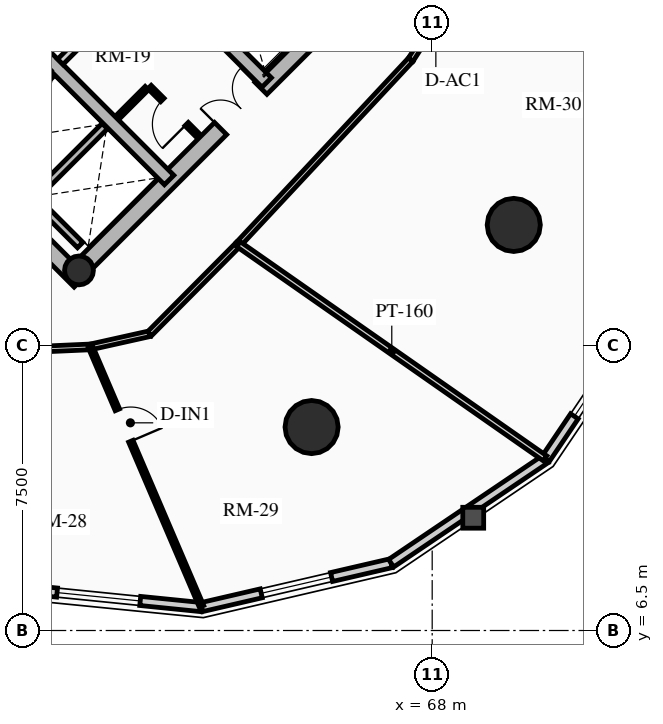
"""IFC4 building model, lengths in metres.
Left out: names, types, materials, properties, quantities, classifications, styles, units other than length and angle.
Written with IfcOpenShell. Run it as: python <this file> out.ifc"""

import sys

from ifc_helpers import new_model, si_unit, direction, frame, frame_2d, origin, origin_2d, place, context, subcontext, project, spatial, rectangle, circle, hollow_circle, extrude, source, transform, mapped, element, fill, save


model = new_model("IFC4")
c1 = context("Model", 3, precision=1e-05, world=origin(), true_north=direction((0.0, 1.0)))
c2 = subcontext(c1, "Body", "Model", "MODEL_VIEW")
j1 = project(units=[si_unit("LENGTHUNIT", "METRE"), si_unit("PLANEANGLEUNIT", "RADIAN")], contexts=[c1])
p1 = place(None, origin())
s1 = spatial("IfcSite", under=j1, at=p1, CompositionType="ELEMENT")
p2 = place(p1, origin())
s2 = spatial("IfcBuilding", under=s1, at=p2, CompositionType="ELEMENT")
p3 = place(p2, frame((0.0, 0.0, 113.8)))
s3 = spatial("IfcBuildingStorey", under=s2, at=p3, CompositionType="ELEMENT", Elevation=113.8)
p4 = place(p3, frame((58.737, 15.697, 0.0), z_axis=(0.0, 0.0, 1.0), x_axis=(-0.707106781187, 0.707106781187, 0.0)))
e1 = element("IfcWall", 1, at=p4, inside=s3, PredefinedType="SHEAR", context=c2, shape_type="SweptSolid", body=[
    extrude(rectangle(XDim=14.2, YDim=0.45, at=frame_2d((7.1, 0.0))), origin(), (0.0, 0.0, 1.0), 2.91),
])
p5 = place(p3, frame((58.578, 15.856, 0.0), z_axis=(0.0, 0.0, 1.0), x_axis=(0.707106781187, 0.707106781187, 0.0)))
e2 = element("IfcWall", 2, at=p5, inside=s3, PredefinedType="SHEAR", context=c2, shape_type="SweptSolid", body=[
    extrude(rectangle(XDim=10.7, YDim=0.45, at=frame_2d((5.35, 0.0))), origin(), (0.0, 0.0, 1.0), 2.91),
])
m1 = source(origin(), c2, "Body", "SweptSolid", [
    extrude(rectangle(XDim=1.5, YDim=2.02, at=frame_2d((0.75, 1.01))), frame((0.0, 0.235, 0.0), z_axis=(0.0, -1.0, 0.0), x_axis=(1.0, 0.0, 0.0)), (0.0, 0.0, 1.0), 0.47),
])
p6 = place(p5, frame((5.45, 0.0, 0.0)))
e3 = element("IfcOpeningElement", 3, at=p6, cuts=e2, PredefinedType="OPENING", context=c2, shape_type="MappedRepresentation", body=[
    mapped(m1, transform((0.0, 0.0, 0.0), x_axis=(1.0, 0.0, 0.0), y_axis=(0.0, 1.0, 0.0), z_axis=(0.0, 0.0, 1.0), scale=1.0)),
])
p7 = place(p3, frame((61.078, 18.355, 0.0), z_axis=(0.0, 0.0, 1.0), x_axis=(-0.707106781187, 0.707106781187, 0.0)))
e4 = element("IfcWall", 4, at=p7, inside=s3, PredefinedType="SHEAR", context=c2, shape_type="SweptSolid", body=[
    extrude(rectangle(XDim=13.75, YDim=0.35, at=frame_2d((6.875, 0.0))), origin(), (0.0, 0.0, 1.0), 2.91),
])
m2 = source(origin(), c2, "Body", "SweptSolid", [
    extrude(rectangle(XDim=1.1, YDim=2.015, at=frame_2d((0.55, 1.007))), frame((0.0, 0.185, 0.0), z_axis=(0.0, -1.0, 0.0), x_axis=(1.0, 0.0, 0.0)), (0.0, 0.0, 1.0), 0.37),
])
p8 = place(p7, frame((4.875, 0.0, 0.0)))
e5 = element("IfcOpeningElement", 5, at=p8, cuts=e4, PredefinedType="OPENING", context=c2, shape_type="MappedRepresentation", body=[
    mapped(m2, transform((0.0, 0.0, 0.0), x_axis=(1.0, 0.0, 0.0), y_axis=(0.0, 1.0, 0.0), z_axis=(0.0, 0.0, 1.0), scale=1.0)),
])
m3 = source(origin(), c2, "Body", "SweptSolid", [
    extrude(rectangle(XDim=1.15, YDim=2.02, at=frame_2d((0.575, 1.01))), frame((0.0, 0.185, 0.0), z_axis=(0.0, -1.0, 0.0), x_axis=(1.0, 0.0, 0.0)), (0.0, 0.0, 1.0), 0.37),
])
p9 = place(p7, frame((7.295, 0.0, 0.0)))
e6 = element("IfcOpeningElement", 6, at=p9, cuts=e4, PredefinedType="OPENING", context=c2, shape_type="MappedRepresentation", body=[
    mapped(m3, transform((0.0, 0.0, 0.0), x_axis=(1.0, 0.0, 0.0), y_axis=(0.0, 1.0, 0.0), z_axis=(0.0, 0.0, 1.0), scale=1.0)),
])
p10 = place(p3, frame((63.645, 20.922, 0.0), z_axis=(0.0, 0.0, 1.0), x_axis=(-0.707106781187, 0.707106781187, 0.0)))
e7 = element("IfcWall", 7, at=p10, inside=s3, PredefinedType="SHEAR", context=c2, shape_type="SweptSolid", body=[
    extrude(rectangle(XDim=13.75, YDim=0.35, at=frame_2d((6.875, 0.0))), origin(), (0.0, 0.0, 1.0), 2.91),
])
p11 = place(p10, frame((10.0, 0.0, 0.0)))
e8 = element("IfcOpeningElement", 8, at=p11, cuts=e7, PredefinedType="OPENING", context=c2, shape_type="MappedRepresentation", body=[
    mapped(m2, transform((0.0, 0.0, 0.0), x_axis=(1.0, 0.0, 0.0), y_axis=(0.0, 1.0, 0.0), z_axis=(0.0, 0.0, 1.0), scale=1.0)),
])
p12 = place(p10, frame((12.0, 0.0, 0.0)))
e9 = element("IfcOpeningElement", 9, at=p12, cuts=e7, PredefinedType="OPENING", context=c2, shape_type="MappedRepresentation", body=[
    mapped(m2, transform((0.0, 0.0, 0.0), x_axis=(1.0, 0.0, 0.0), y_axis=(0.0, 1.0, 0.0), z_axis=(0.0, 0.0, 1.0), scale=1.0)),
])
p13 = place(p10, frame((5.305, 0.0, 0.0)))
e10 = element("IfcOpeningElement", 10, at=p13, cuts=e7, PredefinedType="OPENING", context=c2, shape_type="MappedRepresentation", body=[
    mapped(m3, transform((0.0, 0.0, 0.0), x_axis=(1.0, 0.0, 0.0), y_axis=(0.0, 1.0, 0.0), z_axis=(0.0, 0.0, 1.0), scale=1.0)),
])
p14 = place(p3, frame((58.706, 15.976, 0.0), z_axis=(0.0, 0.0, 1.0), x_axis=(0.707106781187, 0.707106781187, 0.0)))
e11 = element("IfcColumn", 11, at=p14, inside=s3, PredefinedType="COLUMN", context=c2, shape_type="SweptSolid", body=[
    extrude(hollow_circle(Radius=0.38, WallThickness=0.032, at=origin_2d()), origin(), (0.0, 0.0, 1.0), 2.91),
])
for number, where, z_axis, x_axis in (
    (12, (64.827, 11.854, 0.0), (0.0, 0.0, 1.0), (1.0, 0.0, 0.0)),
    (13, (70.146, 17.173, 0.0), (0.0, 0.0, 1.0), (1.0, 0.0, 0.0)),
):
    element("IfcColumn", number, at=place(p3, frame(where, z_axis=z_axis, x_axis=x_axis)), inside=s3, PredefinedType="USERDEFINED", context=c2, shape_type="SweptSolid", body=[
        extrude(circle(Radius=0.7, at=origin_2d()), origin(), (0.0, 0.0, 1.0), 2.91),
    ])
p15 = place(p3, frame((61.933, 7.115, 0.0), z_axis=(0.0, 0.0, 1.0), x_axis=(-0.994971754311, 0.10015591906, 0.0)))
e14 = element("IfcWall", 14, at=p15, inside=s3, PredefinedType="SOLIDWALL", context=c2, shape_type="SweptSolid", body=[
    extrude(rectangle(XDim=5.448, YDim=0.24, at=frame_2d((2.724, 0.0))), origin(), (0.0, 0.0, 1.0), 2.179),
])
m4 = source(origin(), c2, "Body", "SweptSolid", [
    extrude(rectangle(XDim=2.2, YDim=1.35, at=frame_2d((1.1, 0.675))), frame((0.0, 0.13, 0.0), z_axis=(0.0, -1.0, 0.0), x_axis=(1.0, 0.0, 0.0)), (0.0, 0.0, 1.0), 0.26),
])
p16 = place(p15, frame((1.624, 0.0, 0.65)))
e15 = element("IfcOpeningElement", 15, at=p16, cuts=e14, PredefinedType="OPENING", context=c2, shape_type="MappedRepresentation", body=[
    mapped(m4, transform((0.0, 0.0, 0.0), x_axis=(1.0, 0.0, 0.0), y_axis=(0.0, 1.0, 0.0), z_axis=(0.0, 0.0, 1.0), scale=1.0)),
])
p17 = place(p3, frame((66.92, 8.271, 0.0), z_axis=(0.0, 0.0, 1.0), x_axis=(-0.974165631126, -0.225834725257, 0.0)))
e16 = element("IfcWall", 16, at=p17, inside=s3, PredefinedType="SOLIDWALL", context=c2, shape_type="SweptSolid", body=[
    extrude(rectangle(XDim=5.119, YDim=0.24, at=frame_2d((2.56, 0.0))), origin(), (0.0, 0.0, 1.0), 2.179),
])
m5 = source(origin(), c2, "Body", "SweptSolid", [
    extrude(rectangle(XDim=1.9, YDim=1.35, at=frame_2d((0.95, 0.675))), frame((0.0, 0.13, 0.0), z_axis=(0.0, -1.0, 0.0), x_axis=(1.0, 0.0, 0.0)), (0.0, 0.0, 1.0), 0.26),
])
p18 = place(p17, frame((1.609, 0.0, 0.65)))
e17 = element("IfcOpeningElement", 17, at=p18, cuts=e16, PredefinedType="OPENING", context=c2, shape_type="MappedRepresentation", body=[
    mapped(m5, transform((0.0, 0.0, 0.0), x_axis=(1.0, 0.0, 0.0), y_axis=(0.0, 1.0, 0.0), z_axis=(0.0, 0.0, 1.0), scale=1.0)),
])
p19 = place(p3, frame((70.985, 11.015, 0.0), z_axis=(0.0, 0.0, 1.0), x_axis=(-0.828781148131, -0.559572880421, 0.0)))
e18 = element("IfcWall", 18, at=p19, inside=s3, PredefinedType="SOLIDWALL", context=c2, shape_type="SweptSolid", body=[
    extrude(rectangle(XDim=4.905, YDim=0.24, at=frame_2d((2.452, 0.0))), origin(), (0.0, 0.0, 1.0), 2.179),
])
p20 = place(p3, frame((73.729, 15.08, 0.0), z_axis=(0.0, 0.0, 1.0), x_axis=(-0.559572880421, -0.828781148131, 0.0)))
e19 = element("IfcWall", 19, at=p20, inside=s3, PredefinedType="SOLIDWALL", context=c2, shape_type="SweptSolid", body=[
    extrude(rectangle(XDim=4.905, YDim=0.24, at=frame_2d((2.452, 0.0))), origin(), (0.0, 0.0, 1.0), 2.179),
])
p21 = place(p20, frame((1.352, 0.0, 0.65)))
e20 = element("IfcOpeningElement", 20, at=p21, cuts=e19, PredefinedType="OPENING", context=c2, shape_type="MappedRepresentation", body=[
    mapped(m4, transform((0.0, 0.0, 0.0), x_axis=(1.0, 0.0, 0.0), y_axis=(0.0, 1.0, 0.0), z_axis=(0.0, 0.0, 1.0), scale=1.0)),
])
p22 = place(p3, frame((55.888, 19.069, 0.0), z_axis=(0.0, 0.0, 1.0), x_axis=(0.707106781187, 0.707106781187, 0.0)))
e21 = element("IfcWall", 21, at=p22, inside=s3, PredefinedType="SHEAR", context=c2, shape_type="SweptSolid", body=[
    extrude(rectangle(XDim=2.97, YDim=0.2, at=frame_2d((1.485, 0.0))), origin(), (0.0, 0.0, 1.0), 2.91),
])
p23 = place(p3, frame((57.284, 17.673, 0.0), z_axis=(0.0, 0.0, 1.0), x_axis=(0.707147878904, 0.70706568108, 0.0)))
e22 = element("IfcWall", 22, at=p23, inside=s3, PredefinedType="SHEAR", context=c2, shape_type="SweptSolid", body=[
    extrude(rectangle(XDim=2.97, YDim=0.2, at=frame_2d((1.485, 0.0))), origin(), (0.0, 0.0, 1.0), 2.91),
])
p24 = place(p3, frame((58.737, 16.644, 0.0), z_axis=(0.0, 0.0, 1.0), x_axis=(-0.707032117043, 0.707181437447, 0.0)))
e23 = element("IfcWall", 23, at=p24, inside=s3, PredefinedType="SHEAR", context=c2, shape_type="SweptSolid", body=[
    extrude(rectangle(XDim=1.635, YDim=0.2, at=frame_2d((0.817, 0.0))), origin(), (0.0, 0.0, 1.0), 2.91),
])
p25 = place(p3, frame((58.214, 21.467, 0.0), z_axis=(0.0, 0.0, 1.0), x_axis=(0.707106781187, 0.707106781187, 0.0)))
e24 = element("IfcWall", 24, at=p25, inside=s3, PredefinedType="PARTITIONING", context=c2, shape_type="SweptSolid", body=[
    extrude(rectangle(XDim=3.28, YDim=0.2, at=frame_2d((1.64, 0.0))), origin(), (0.0, 0.0, 1.0), 2.655),
])
m6 = source(origin(), c2, "Body", "SweptSolid", [
    extrude(rectangle(XDim=1.5, YDim=2.02, at=frame_2d((0.75, 1.01))), frame((0.0, 0.11, 0.0), z_axis=(0.0, -1.0, 0.0), x_axis=(1.0, 0.0, 0.0)), (0.0, 0.0, 1.0), 0.22),
])
p26 = place(p25, frame((1.55, 0.0, 0.0)))
e25 = element("IfcOpeningElement", 25, at=p26, cuts=e24, PredefinedType="OPENING", context=c2, shape_type="MappedRepresentation", body=[
    mapped(m6, transform((0.0, 0.0, 0.0), x_axis=(1.0, 0.0, 0.0), y_axis=(0.0, 1.0, 0.0), z_axis=(0.0, 0.0, 1.0), scale=1.0)),
])
p27 = place(p3, frame((61.835, 19.529, 0.0), z_axis=(0.0, 0.0, 1.0), x_axis=(-0.707174592913, 0.707038962956, 0.0)))
e26 = element("IfcWall", 26, at=p27, inside=s3, PredefinedType="PARTITIONING", context=c2, shape_type="SweptSolid", body=[
    extrude(rectangle(XDim=1.8, YDim=0.125, at=frame_2d((0.9, 0.0))), origin(), (0.0, 0.0, 1.0), 2.655),
])
m7 = source(origin(), c2, "Body", "SweptSolid", [
    extrude(rectangle(XDim=0.9, YDim=2.005, at=frame_2d((0.45, 1.002))), frame((0.0, 0.073, 0.0), z_axis=(0.0, -1.0, 0.0), x_axis=(1.0, 0.0, 0.0)), (0.0, 0.0, 1.0), 0.145),
])
p28 = place(p27, frame((0.42, 0.0, 0.0)))
e27 = element("IfcOpeningElement", 27, at=p28, cuts=e26, PredefinedType="OPENING", context=c2, shape_type="MappedRepresentation", body=[
    mapped(m7, transform((0.0, 0.0, 0.0), x_axis=(1.0, 0.0, 0.0), y_axis=(0.0, 1.0, 0.0), z_axis=(0.0, 0.0, 1.0), scale=1.0)),
])
p29 = place(p3, frame((59.713, 19.996, 0.0), z_axis=(0.0, 0.0, 1.0), x_axis=(0.707217726, 0.706995818963, 0.0)))
e28 = element("IfcWall", 28, at=p29, inside=s3, PredefinedType="PARTITIONING", context=c2, shape_type="SweptSolid", body=[
    extrude(rectangle(XDim=1.1, YDim=0.125, at=frame_2d((0.55, 0.0))), origin(), (0.0, 0.0, 1.0), 2.655),
])
p30 = place(p3, frame((57.511, 13.897, 0.0), z_axis=(0.0, 0.0, 1.0), x_axis=(0.999024538494, 0.044158481476, 0.0)))
e29 = element("IfcWall", 29, at=p30, inside=s3, PredefinedType="PARTITIONING", context=c2, shape_type="SweptSolid", body=[
    extrude(rectangle(XDim=1.498, YDim=0.15, at=frame_2d((0.749, 0.0))), origin(), (0.0, 0.0, 1.0), 2.225),
])
p31 = place(p3, frame((59.008, 13.963, 0.0), z_axis=(0.0, 0.0, 1.0), x_axis=(0.976020856791, 0.21767702476, 0.0)))
e30 = element("IfcWall", 30, at=p31, inside=s3, PredefinedType="PARTITIONING", context=c2, shape_type="SweptSolid", body=[
    extrude(rectangle(XDim=1.593, YDim=0.15, at=frame_2d((0.796, 0.0))), origin(), (0.0, 0.0, 1.0), 2.225),
])
p32 = place(p3, frame((60.562, 14.31, 0.0), z_axis=(0.0, 0.0, 1.0), x_axis=(0.704566236161, 0.709638230975, 0.0)))
e31 = element("IfcWall", 31, at=p32, inside=s3, PredefinedType="PARTITIONING", context=c2, shape_type="SweptSolid", body=[
    extrude(rectangle(XDim=3.321, YDim=0.15, at=frame_2d((1.661, 0.0))), origin(), (0.0, 0.0, 1.0), 2.225),
])
p33 = place(p3, frame((62.903, 16.667, 0.0), z_axis=(0.0, 0.0, 1.0), x_axis=(0.682371947497, 0.731005147225, 0.0)))
e32 = element("IfcWall", 32, at=p33, inside=s3, PredefinedType="PARTITIONING", context=c2, shape_type="SweptSolid", body=[
    extrude(rectangle(XDim=6.642, YDim=0.15, at=frame_2d((3.321, 0.0))), origin(), (0.0, 0.0, 1.0), 2.225),
])
p34 = place(p3, frame((67.435, 21.521, 0.0), z_axis=(0.0, 0.0, 1.0), x_axis=(0.540777197838, 0.841165870859, 0.0)))
e33 = element("IfcWall", 33, at=p34, inside=s3, PredefinedType="PARTITIONING", context=c2, shape_type="SweptSolid", body=[
    extrude(rectangle(XDim=1.888, YDim=0.15, at=frame_2d((0.944, 0.0))), origin(), (0.0, 0.0, 1.0), 2.225),
])
m8 = source(origin(), c2, "Body", "SweptSolid", [
    extrude(rectangle(XDim=1.0, YDim=2.015, at=frame_2d((0.5, 1.007))), frame((0.0, 0.085, 0.0), z_axis=(0.0, -1.0, 0.0), x_axis=(1.0, 0.0, 0.0)), (0.0, 0.0, 1.0), 0.17),
])
p35 = place(p34, frame((0.444, 0.0, 0.0)))
e34 = element("IfcOpeningElement", 34, at=p35, cuts=e33, PredefinedType="OPENING", context=c2, shape_type="MappedRepresentation", body=[
    mapped(m8, transform((0.0, 0.0, 0.0), x_axis=(1.0, 0.0, 0.0), y_axis=(0.0, 1.0, 0.0), z_axis=(0.0, 0.0, 1.0), scale=1.0)),
])
p36 = place(p3, frame((62.903, 16.667, 0.0), z_axis=(0.0, 0.0, 1.0), x_axis=(0.819735047612, -0.572742919395, 0.0)))
e35 = element("IfcWall", 35, at=p36, inside=s3, PredefinedType="PARTITIONING", context=c2, shape_type="SweptSolid", body=[
    extrude(rectangle(XDim=9.842, YDim=0.16, at=frame_2d((4.921, 0.0))), origin(), (0.0, 0.0, 1.0), 2.179),
])
p37 = place(p3, frame((59.008, 13.963, 0.0), z_axis=(0.0, 0.0, 1.0), x_axis=(0.393439207333, -0.919350635032, 0.0)))
e36 = element("IfcWall", 36, at=p37, inside=s3, PredefinedType="PARTITIONING", context=c2, shape_type="SweptSolid", body=[
    extrude(rectangle(XDim=7.427, YDim=0.125, at=frame_2d((3.713, 0.0))), origin(), (0.0, 0.0, 1.0), 2.179),
])
p38 = place(p37, frame((1.8, 0.0, 0.0)))
e37 = element("IfcOpeningElement", 37, at=p38, cuts=e36, PredefinedType="OPENING", context=c2, shape_type="MappedRepresentation", body=[
    mapped(m7, transform((0.0, 0.0, 0.0), x_axis=(1.0, 0.0, 0.0), y_axis=(0.0, 1.0, 0.0), z_axis=(0.0, 0.0, 1.0), scale=1.0)),
])
m9 = source(origin(), c2, "Body", "SweptSolid", [
    extrude(rectangle(XDim=2.2, YDim=1.35, at=frame_2d((1.1, 0.675))), frame((0.0, 0.03, 0.0), z_axis=(0.0, -1.0, 0.0), x_axis=(1.0, 0.0, 0.0)), (0.0, 0.0, 1.0), 0.06),
])
p39 = place(p16, origin())
e38 = element("IfcWindow", 38, at=p39, inside=s3, PartitioningType="DOUBLE_PANEL_VERTICAL", PredefinedType="WINDOW", context=c2, shape_type="MappedRepresentation", body=[
    mapped(m9, transform((0.0, 0.0, 0.0), x_axis=(1.0, 0.0, 0.0), y_axis=(0.0, 1.0, 0.0), z_axis=(0.0, 0.0, 1.0), scale=1.0)),
])
fill(e15, e38)
m10 = source(origin(), c2, "Body", "SweptSolid", [
    extrude(rectangle(XDim=1.9, YDim=1.35, at=frame_2d((0.95, 0.675))), frame((0.0, 0.03, 0.0), z_axis=(0.0, -1.0, 0.0), x_axis=(1.0, 0.0, 0.0)), (0.0, 0.0, 1.0), 0.06),
])
p40 = place(p18, origin())
e39 = element("IfcWindow", 39, at=p40, inside=s3, PartitioningType="DOUBLE_PANEL_VERTICAL", PredefinedType="WINDOW", context=c2, shape_type="MappedRepresentation", body=[
    mapped(m10, transform((0.0, 0.0, 0.0), x_axis=(1.0, 0.0, 0.0), y_axis=(0.0, 1.0, 0.0), z_axis=(0.0, 0.0, 1.0), scale=1.0)),
])
fill(e17, e39)
p41 = place(p21, origin())
e40 = element("IfcWindow", 40, at=p41, inside=s3, PartitioningType="DOUBLE_PANEL_VERTICAL", PredefinedType="WINDOW", context=c2, shape_type="MappedRepresentation", body=[
    mapped(m9, transform((0.0, 0.0, 0.0), x_axis=(1.0, 0.0, 0.0), y_axis=(0.0, 1.0, 0.0), z_axis=(0.0, 0.0, 1.0), scale=1.0)),
])
fill(e20, e40)
m11 = source(origin(), c2, "Body", "SweptSolid", [
    extrude(rectangle(XDim=1.5, YDim=2.02, at=frame_2d((0.75, 1.01))), frame((0.0, 0.025, 0.0), z_axis=(0.0, -1.0, 0.0), x_axis=(1.0, 0.0, 0.0)), (0.0, 0.0, 1.0), 0.05),
])
p42 = place(p6, origin())
e41 = element("IfcDoor", 41, at=p42, inside=s3, OperationType="DOUBLE_DOOR_SINGLE_SWING", PredefinedType="DOOR", context=c2, shape_type="MappedRepresentation", body=[
    mapped(m11, transform((0.0, 0.0, 0.0), x_axis=(1.0, 0.0, 0.0), y_axis=(0.0, 1.0, 0.0), z_axis=(0.0, 0.0, 1.0), scale=1.0)),
])
fill(e3, e41)
m12 = source(origin(), c2, "Body", "SweptSolid", [
    extrude(rectangle(XDim=0.9, YDim=2.005, at=frame_2d((0.45, 1.002))), frame((0.0, 0.025, 0.0), z_axis=(0.0, -1.0, 0.0), x_axis=(1.0, 0.0, 0.0)), (0.0, 0.0, 1.0), 0.05),
])
p43 = place(p28, origin())
e42 = element("IfcDoor", 42, at=p43, inside=s3, OperationType="SINGLE_SWING_LEFT", PredefinedType="DOOR", context=c2, shape_type="MappedRepresentation", body=[
    mapped(m12, transform((0.0, 0.0, 0.0), x_axis=(1.0, 0.0, 0.0), y_axis=(0.0, 1.0, 0.0), z_axis=(0.0, 0.0, 1.0), scale=1.0)),
])
fill(e27, e42)
p44 = place(p38, origin())
e43 = element("IfcDoor", 43, at=p44, inside=s3, OperationType="SINGLE_SWING_RIGHT", PredefinedType="DOOR", context=c2, shape_type="MappedRepresentation", body=[
    mapped(m12, transform((0.0, 0.0, 0.0), x_axis=(1.0, 0.0, 0.0), y_axis=(0.0, 1.0, 0.0), z_axis=(0.0, 0.0, 1.0), scale=1.0)),
])
fill(e37, e43)
save(model, sys.argv[1])
